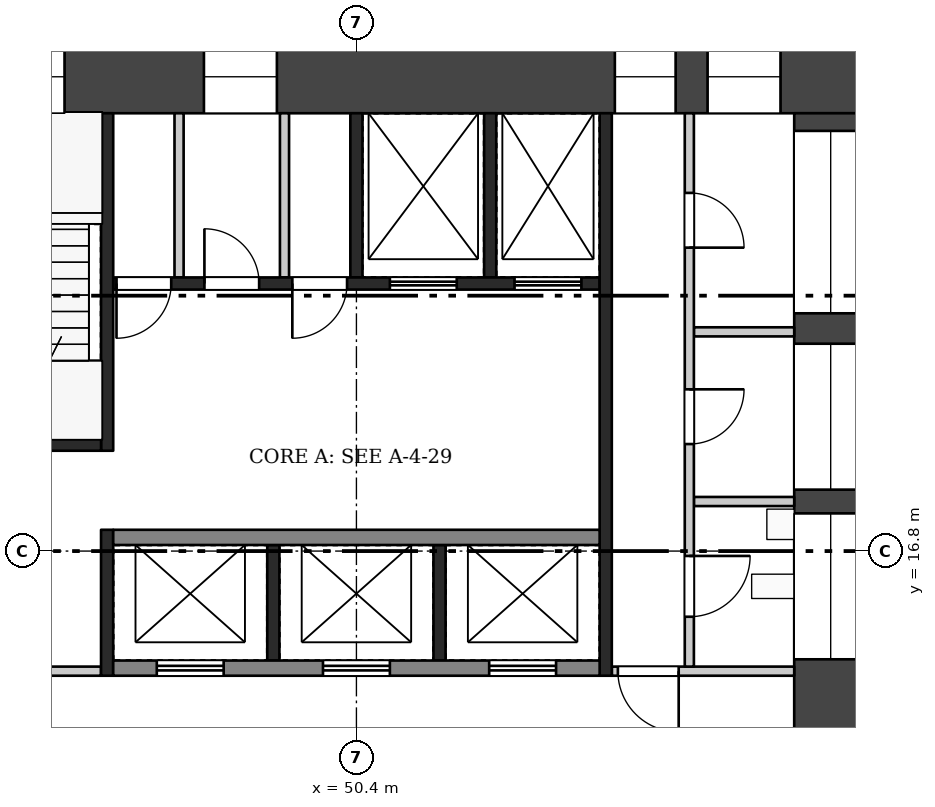
"""IFC4 building model, lengths in metres.
Left out: names, types, materials, properties, quantities, classifications, styles, units other than length and angle.
Written with IfcOpenShell. Run it as: python <this file> out.ifc"""

import sys

from ifc_helpers import new_model, si_unit, direction, frame, frame_2d, origin, place, context, subcontext, project, spatial, rectangle, extrude, element, fill, save


model = new_model("IFC4")
c1 = context("Model", 3, precision=1e-05, world=origin(), true_north=direction((0.0, 1.0)))
c2 = subcontext(c1, "Body", "Model", "MODEL_VIEW")
j1 = project(units=[si_unit("LENGTHUNIT", "METRE"), si_unit("PLANEANGLEUNIT", "RADIAN")], contexts=[c1])
p1 = place(None, origin())
s1 = spatial("IfcSite", under=j1, at=p1, CompositionType="ELEMENT")
p2 = place(p1, origin())
s2 = spatial("IfcBuilding", under=s1, at=p2, CompositionType="ELEMENT")
p3 = place(p2, frame((0.0, 0.0, 207.2)))
s3 = spatial("IfcBuildingStorey", under=s2, at=p3, CompositionType="ELEMENT", Elevation=207.2)
p4 = place(p3, frame((42.0, 24.6, 0.0), z_axis=(0.0, 0.0, 1.0), x_axis=(1.0, 0.0, 0.0)))
e1 = element("IfcWall", 1, at=p4, inside=s3, PredefinedType="SHEAR", context=c2, shape_type="SweptSolid", body=[
    extrude(rectangle(XDim=16.8, YDim=1.2, at=frame_2d((8.4, 0.0))), origin(), (0.0, 0.0, 1.0), 6.72),
])
p5 = place(p4, frame((1.8, 0.0, 0.5)))
e2 = element("IfcOpeningElement", 2, at=p5, cuts=e1, PredefinedType="OPENING", context=c2, shape_type="SweptSolid", body=[
    extrude(rectangle(XDim=1.8, YDim=2.4, at=frame_2d((0.9, 1.2))), frame((0.0, 0.61, 0.0), z_axis=(0.0, -1.0, 0.0), x_axis=(1.0, 0.0, 0.0)), (0.0, 0.0, 1.0), 1.22),
])
p6 = place(p4, frame((5.892, 0.0, 1.6)))
e3 = element("IfcOpeningElement", 3, at=p6, cuts=e1, PredefinedType="OPENING", context=c2, shape_type="SweptSolid", body=[
    extrude(rectangle(XDim=1.2, YDim=1.2, at=frame_2d((0.6, 0.6))), frame((0.0, 0.61, 0.0), z_axis=(0.0, -1.0, 0.0), x_axis=(1.0, 0.0, 0.0)), (0.0, 0.0, 1.0), 1.22),
])
p7 = place(p4, frame((12.65, 0.0, 0.6)))
e4 = element("IfcOpeningElement", 4, at=p7, cuts=e1, PredefinedType="OPENING", context=c2, shape_type="SweptSolid", body=[
    extrude(rectangle(XDim=1.0, YDim=2.1, at=frame_2d((0.5, 1.05))), frame((0.0, 0.61, 0.0), z_axis=(0.0, -1.0, 0.0), x_axis=(1.0, 0.0, 0.0)), (0.0, 0.0, 1.0), 1.22),
])
p8 = place(p4, frame((14.175, 0.0, 1.6)))
e5 = element("IfcOpeningElement", 5, at=p8, cuts=e1, PredefinedType="OPENING", context=c2, shape_type="SweptSolid", body=[
    extrude(rectangle(XDim=1.2, YDim=1.2, at=frame_2d((0.6, 0.6))), frame((0.0, 0.61, 0.0), z_axis=(0.0, -1.0, 0.0), x_axis=(1.0, 0.0, 0.0)), (0.0, 0.0, 1.0), 1.22),
])
p9 = place(p3, frame((58.2, 9.6, 0.0), z_axis=(0.0, 0.0, 1.0), x_axis=(0.0, 1.0, 0.0)))
e6 = element("IfcWall", 6, at=p9, inside=s3, PredefinedType="SHEAR", context=c2, shape_type="SweptSolid", body=[
    extrude(rectangle(XDim=14.4, YDim=1.2, at=frame_2d((7.2, 0.0))), origin(), (0.0, 0.0, 1.0), 6.72),
])
p10 = place(p9, frame((2.1, 0.0, 0.0)))
e7 = element("IfcOpeningElement", 7, at=p10, cuts=e6, PredefinedType="OPENING", context=c2, shape_type="SweptSolid", body=[
    extrude(rectangle(XDim=1.8, YDim=2.1, at=frame_2d((0.9, 1.05))), frame((0.0, 0.61, 0.0), z_axis=(0.0, -1.0, 0.0), x_axis=(1.0, 0.0, 0.0)), (0.0, 0.0, 1.0), 1.22),
])
p11 = place(p9, frame((5.42, 0.0, 1.6)))
e8 = element("IfcOpeningElement", 8, at=p11, cuts=e6, PredefinedType="OPENING", context=c2, shape_type="SweptSolid", body=[
    extrude(rectangle(XDim=2.4, YDim=1.2, at=frame_2d((1.2, 0.6))), frame((0.0, 0.61, 0.0), z_axis=(0.0, -1.0, 0.0), x_axis=(1.0, 0.0, 0.0)), (0.0, 0.0, 1.0), 1.22),
])
p12 = place(p9, frame((8.21, 0.0, 1.6)))
e9 = element("IfcOpeningElement", 9, at=p12, cuts=e6, PredefinedType="OPENING", context=c2, shape_type="SweptSolid", body=[
    extrude(rectangle(XDim=2.4, YDim=1.2, at=frame_2d((1.2, 0.6))), frame((0.0, 0.61, 0.0), z_axis=(0.0, -1.0, 0.0), x_axis=(1.0, 0.0, 0.0)), (0.0, 0.0, 1.0), 1.22),
])
p13 = place(p9, frame((11.11, 0.0, 1.6)))
e10 = element("IfcOpeningElement", 10, at=p13, cuts=e6, PredefinedType="OPENING", context=c2, shape_type="SweptSolid", body=[
    extrude(rectangle(XDim=3.0, YDim=1.2, at=frame_2d((1.5, 0.6))), frame((0.0, 0.61, 0.0), z_axis=(0.0, -1.0, 0.0), x_axis=(1.0, 0.0, 0.0)), (0.0, 0.0, 1.0), 1.22),
])
for number, where, z_axis, x_axis in (
    (11, (49.033, 15.0, 0.0), (0.0, 0.0, 1.0), (0.0, 1.0, 0.0)),
    (12, (51.767, 15.0, 0.0), (0.0, 0.0, 1.0), (0.0, 1.0, 0.0)),
):
    element("IfcWall", number, at=place(p3, frame(where, z_axis=z_axis, x_axis=x_axis)), inside=s3, PredefinedType="SHEAR", context=c2, shape_type="SweptSolid", body=[
        extrude(rectangle(XDim=1.9, YDim=0.2, at=frame_2d((0.95, 0.0))), origin(), (0.0, 0.0, 1.0), 6.72),
    ])
p14 = place(p3, frame((46.4, 14.875, 0.0), z_axis=(0.0, 0.0, 1.0), x_axis=(1.0, 0.0, 0.0)))
e13 = element("IfcWall", 13, at=p14, inside=s3, PredefinedType="SHEAR", context=c2, shape_type="SweptSolid", body=[
    extrude(rectangle(XDim=8.0, YDim=0.25, at=frame_2d((4.0, 0.0))), origin(), (0.0, 0.0, 1.0), 6.72),
])
p15 = place(p14, frame((0.717, 0.0, 0.0)))
e14 = element("IfcOpeningElement", 14, at=p15, cuts=e13, PredefinedType="OPENING", context=c2, shape_type="SweptSolid", body=[
    extrude(rectangle(XDim=1.1, YDim=2.1, at=frame_2d((0.55, 1.05))), frame((0.0, 0.135, 0.0), z_axis=(0.0, -1.0, 0.0), x_axis=(1.0, 0.0, 0.0)), (0.0, 0.0, 1.0), 0.27),
])
p16 = place(p14, frame((3.45, 0.0, 0.0)))
e15 = element("IfcOpeningElement", 15, at=p16, cuts=e13, PredefinedType="OPENING", context=c2, shape_type="SweptSolid", body=[
    extrude(rectangle(XDim=1.1, YDim=2.1, at=frame_2d((0.55, 1.05))), frame((0.0, 0.135, 0.0), z_axis=(0.0, -1.0, 0.0), x_axis=(1.0, 0.0, 0.0)), (0.0, 0.0, 1.0), 0.27),
])
p17 = place(p14, frame((6.183, 0.0, 0.0)))
e16 = element("IfcOpeningElement", 16, at=p17, cuts=e13, PredefinedType="OPENING", context=c2, shape_type="SweptSolid", body=[
    extrude(rectangle(XDim=1.1, YDim=2.1, at=frame_2d((0.55, 1.05))), frame((0.0, 0.135, 0.0), z_axis=(0.0, -1.0, 0.0), x_axis=(1.0, 0.0, 0.0)), (0.0, 0.0, 1.0), 0.27),
])
p18 = place(p3, frame((46.4, 17.025, 0.0), z_axis=(0.0, 0.0, 1.0), x_axis=(1.0, 0.0, 0.0)))
e17 = element("IfcWall", 17, at=p18, inside=s3, PredefinedType="SHEAR", context=c2, shape_type="SweptSolid", body=[
    extrude(rectangle(XDim=8.0, YDim=0.25, at=frame_2d((4.0, 0.0))), origin(), (0.0, 0.0, 1.0), 6.72),
])
for number, where, z_axis, x_axis in (
    (18, (50.4, 21.3, 0.0), (0.0, 0.0, 1.0), (0.0, 1.0, 0.0)),
    (19, (52.6, 21.3, 0.0), (0.0, 0.0, 1.0), (0.0, 1.0, 0.0)),
):
    element("IfcWall", number, at=place(p3, frame(where, z_axis=z_axis, x_axis=x_axis)), inside=s3, PredefinedType="SHEAR", context=c2, shape_type="SweptSolid", body=[
        extrude(rectangle(XDim=2.7, YDim=0.2, at=frame_2d((1.35, 0.0))), origin(), (0.0, 0.0, 1.0), 6.72),
    ])
for number, where, z_axis, x_axis in (
    (20, (47.483, 21.3, 0.0), (0.0, 0.0, 1.0), (0.0, 1.0, 0.0)),
    (21, (49.217, 21.3, 0.0), (0.0, 0.0, 1.0), (0.0, 1.0, 0.0)),
):
    element("IfcWall", number, at=place(p3, frame(where, z_axis=z_axis, x_axis=x_axis)), inside=s3, PredefinedType="PARTITIONING", context=c2, shape_type="SweptSolid", body=[
        extrude(rectangle(XDim=2.7, YDim=0.15, at=frame_2d((1.35, 0.0))), origin(), (0.0, 0.0, 1.0), 6.72),
    ])
p19 = place(p3, frame((46.4, 21.2, 0.0), z_axis=(0.0, 0.0, 1.0), x_axis=(1.0, 0.0, 0.0)))
e22 = element("IfcWall", 22, at=p19, inside=s3, PredefinedType="SHEAR", context=c2, shape_type="SweptSolid", body=[
    extrude(rectangle(XDim=8.0, YDim=0.2, at=frame_2d((4.0, 0.0))), origin(), (0.0, 0.0, 1.0), 6.72),
])
p20 = place(p19, frame((0.054, 0.0, 0.0)))
e23 = element("IfcOpeningElement", 23, at=p20, cuts=e22, PredefinedType="OPENING", context=c2, shape_type="SweptSolid", body=[
    extrude(rectangle(XDim=0.9, YDim=2.1, at=frame_2d((0.45, 1.05))), frame((0.0, 0.11, 0.0), z_axis=(0.0, -1.0, 0.0), x_axis=(1.0, 0.0, 0.0)), (0.0, 0.0, 1.0), 0.22),
])
p21 = place(p19, frame((1.5, 0.0, 0.0)))
e24 = element("IfcOpeningElement", 24, at=p21, cuts=e22, PredefinedType="OPENING", context=c2, shape_type="SweptSolid", body=[
    extrude(rectangle(XDim=0.9, YDim=2.1, at=frame_2d((0.45, 1.05))), frame((0.0, 0.11, 0.0), z_axis=(0.0, -1.0, 0.0), x_axis=(1.0, 0.0, 0.0)), (0.0, 0.0, 1.0), 0.22),
])
p22 = place(p19, frame((2.946, 0.0, 0.0)))
e25 = element("IfcOpeningElement", 25, at=p22, cuts=e22, PredefinedType="OPENING", context=c2, shape_type="SweptSolid", body=[
    extrude(rectangle(XDim=0.9, YDim=2.1, at=frame_2d((0.45, 1.05))), frame((0.0, 0.11, 0.0), z_axis=(0.0, -1.0, 0.0), x_axis=(1.0, 0.0, 0.0)), (0.0, 0.0, 1.0), 0.22),
])
p23 = place(p19, frame((4.55, 0.0, 0.0)))
e26 = element("IfcOpeningElement", 26, at=p23, cuts=e22, PredefinedType="OPENING", context=c2, shape_type="SweptSolid", body=[
    extrude(rectangle(XDim=1.1, YDim=2.1, at=frame_2d((0.55, 1.05))), frame((0.0, 0.11, 0.0), z_axis=(0.0, -1.0, 0.0), x_axis=(1.0, 0.0, 0.0)), (0.0, 0.0, 1.0), 0.22),
])
p24 = place(p19, frame((6.6, 0.0, 0.0)))
e27 = element("IfcOpeningElement", 27, at=p24, cuts=e22, PredefinedType="OPENING", context=c2, shape_type="SweptSolid", body=[
    extrude(rectangle(XDim=1.1, YDim=2.1, at=frame_2d((0.55, 1.05))), frame((0.0, 0.11, 0.0), z_axis=(0.0, -1.0, 0.0), x_axis=(1.0, 0.0, 0.0)), (0.0, 0.0, 1.0), 0.22),
])
p25 = place(p3, frame((46.3, 14.75, 0.0), z_axis=(0.0, 0.0, 1.0), x_axis=(0.0, 1.0, 0.0)))
e28 = element("IfcWall", 28, at=p25, inside=s3, PredefinedType="SHEAR", context=c2, shape_type="SweptSolid", body=[
    extrude(rectangle(XDim=2.4, YDim=0.2, at=frame_2d((1.2, 0.0))), origin(), (0.0, 0.0, 1.0), 6.72),
])
p26 = place(p3, frame((46.3, 18.45, 0.0), z_axis=(0.0, 0.0, 1.0), x_axis=(0.0, 1.0, 0.0)))
e29 = element("IfcWall", 29, at=p26, inside=s3, PredefinedType="SHEAR", context=c2, shape_type="SweptSolid", body=[
    extrude(rectangle(XDim=5.55, YDim=0.2, at=frame_2d((2.775, 0.0))), origin(), (0.0, 0.0, 1.0), 6.72),
])
p27 = place(p3, frame((43.2, 14.825, 0.0), z_axis=(0.0, 0.0, 1.0), x_axis=(1.0, 0.0, 0.0)))
e30 = element("IfcWall", 30, at=p27, inside=s3, PredefinedType="PARTITIONING", context=c2, shape_type="SweptSolid", body=[
    extrude(rectangle(XDim=3.0, YDim=0.15, at=frame_2d((1.5, 0.0))), origin(), (0.0, 0.0, 1.0), 6.72),
])
p28 = place(p27, frame((1.0, 0.0, 0.0)))
e31 = element("IfcOpeningElement", 31, at=p28, cuts=e30, PredefinedType="OPENING", context=c2, shape_type="SweptSolid", body=[
    extrude(rectangle(XDim=1.0, YDim=2.1, at=frame_2d((0.5, 1.05))), frame((0.0, 0.085, 0.0), z_axis=(0.0, -1.0, 0.0), x_axis=(1.0, 0.0, 0.0)), (0.0, 0.0, 1.0), 0.17),
])
p29 = place(p3, frame((43.2, 18.55, 0.0), z_axis=(0.0, 0.0, 1.0), x_axis=(1.0, 0.0, 0.0)))
e32 = element("IfcWall", 32, at=p29, inside=s3, PredefinedType="SHEAR", context=c2, shape_type="SweptSolid", body=[
    extrude(rectangle(XDim=3.0, YDim=0.2, at=frame_2d((1.5, 0.0))), origin(), (0.0, 0.0, 1.0), 6.72),
])
p30 = place(p29, frame((1.0, 0.0, 0.0)))
e33 = element("IfcOpeningElement", 33, at=p30, cuts=e32, PredefinedType="OPENING", context=c2, shape_type="SweptSolid", body=[
    extrude(rectangle(XDim=1.0, YDim=2.1, at=frame_2d((0.5, 1.05))), frame((0.0, 0.11, 0.0), z_axis=(0.0, -1.0, 0.0), x_axis=(1.0, 0.0, 0.0)), (0.0, 0.0, 1.0), 0.22),
])
p31 = place(p3, frame((54.5, 14.75, 0.0), z_axis=(0.0, 0.0, 1.0), x_axis=(0.0, 1.0, 0.0)))
e34 = element("IfcWall", 34, at=p31, inside=s3, PredefinedType="SHEAR", context=c2, shape_type="SweptSolid", body=[
    extrude(rectangle(XDim=9.25, YDim=0.2, at=frame_2d((4.625, 0.0))), origin(), (0.0, 0.0, 1.0), 6.72),
])
p32 = place(p3, frame((54.6, 14.825, 0.0), z_axis=(0.0, 0.0, 1.0), x_axis=(1.0, 0.0, 0.0)))
e35 = element("IfcWall", 35, at=p32, inside=s3, PredefinedType="PARTITIONING", context=c2, shape_type="SweptSolid", body=[
    extrude(rectangle(XDim=3.0, YDim=0.15, at=frame_2d((1.5, 0.0))), origin(), (0.0, 0.0, 1.0), 6.72),
])
p33 = place(p32, frame((0.1, 0.0, 0.0)))
e36 = element("IfcOpeningElement", 36, at=p33, cuts=e35, PredefinedType="OPENING", context=c2, shape_type="SweptSolid", body=[
    extrude(rectangle(XDim=1.0, YDim=2.1, at=frame_2d((0.5, 1.05))), frame((0.0, 0.085, 0.0), z_axis=(0.0, -1.0, 0.0), x_axis=(1.0, 0.0, 0.0)), (0.0, 0.0, 1.0), 0.17),
])
for number, where, z_axis, x_axis in (
    (37, (55.95, 17.615, 0.0), (0.0, 0.0, 1.0), (1.0, 0.0, 0.0)),
    (38, (55.95, 20.405, 0.0), (0.0, 0.0, 1.0), (1.0, 0.0, 0.0)),
):
    element("IfcWall", number, at=place(p3, frame(where, z_axis=z_axis, x_axis=x_axis)), inside=s3, PredefinedType="PARTITIONING", context=c2, shape_type="SweptSolid", body=[
        extrude(rectangle(XDim=1.65, YDim=0.15, at=frame_2d((0.825, 0.0))), origin(), (0.0, 0.0, 1.0), 6.72),
    ])
p34 = place(p3, frame((55.875, 14.9, 0.0), z_axis=(0.0, 0.0, 1.0), x_axis=(0.0, 1.0, 0.0)))
e39 = element("IfcWall", 39, at=p34, inside=s3, PredefinedType="PARTITIONING", context=c2, shape_type="SweptSolid", body=[
    extrude(rectangle(XDim=9.1, YDim=0.15, at=frame_2d((4.55, 0.0))), origin(), (0.0, 0.0, 1.0), 6.72),
])
p35 = place(p34, frame((0.82, 0.0, 0.0)))
e40 = element("IfcOpeningElement", 40, at=p35, cuts=e39, PredefinedType="OPENING", context=c2, shape_type="SweptSolid", body=[
    extrude(rectangle(XDim=1.0, YDim=2.1, at=frame_2d((0.5, 1.05))), frame((0.0, 0.085, 0.0), z_axis=(0.0, -1.0, 0.0), x_axis=(1.0, 0.0, 0.0)), (0.0, 0.0, 1.0), 0.17),
])
p36 = place(p34, frame((3.66, 0.0, 0.0)))
e41 = element("IfcOpeningElement", 41, at=p36, cuts=e39, PredefinedType="OPENING", context=c2, shape_type="SweptSolid", body=[
    extrude(rectangle(XDim=0.9, YDim=2.1, at=frame_2d((0.45, 1.05))), frame((0.0, 0.085, 0.0), z_axis=(0.0, -1.0, 0.0), x_axis=(1.0, 0.0, 0.0)), (0.0, 0.0, 1.0), 0.17),
])
p37 = place(p34, frame((6.89, 0.0, 0.0)))
e42 = element("IfcOpeningElement", 42, at=p37, cuts=e39, PredefinedType="OPENING", context=c2, shape_type="SweptSolid", body=[
    extrude(rectangle(XDim=0.9, YDim=2.1, at=frame_2d((0.45, 1.05))), frame((0.0, 0.085, 0.0), z_axis=(0.0, -1.0, 0.0), x_axis=(1.0, 0.0, 0.0)), (0.0, 0.0, 1.0), 0.17),
])
p38 = place(p15, origin())
e43 = element("IfcDoor", 43, at=p38, inside=s3, OperationType="DOUBLE_DOOR_SLIDING", PredefinedType="DOOR", context=c2, shape_type="SweptSolid", body=[
    extrude(rectangle(XDim=1.1, YDim=2.1, at=frame_2d((0.55, 1.05))), frame((0.0, 0.025, 0.0), z_axis=(0.0, -1.0, 0.0), x_axis=(1.0, 0.0, 0.0)), (0.0, 0.0, 1.0), 0.05),
])
fill(e14, e43)
p39 = place(p16, origin())
e44 = element("IfcDoor", 44, at=p39, inside=s3, OperationType="DOUBLE_DOOR_SLIDING", PredefinedType="DOOR", context=c2, shape_type="SweptSolid", body=[
    extrude(rectangle(XDim=1.1, YDim=2.1, at=frame_2d((0.55, 1.05))), frame((0.0, 0.025, 0.0), z_axis=(0.0, -1.0, 0.0), x_axis=(1.0, 0.0, 0.0)), (0.0, 0.0, 1.0), 0.05),
])
fill(e15, e44)
p40 = place(p17, origin())
e45 = element("IfcDoor", 45, at=p40, inside=s3, OperationType="DOUBLE_DOOR_SLIDING", PredefinedType="DOOR", context=c2, shape_type="SweptSolid", body=[
    extrude(rectangle(XDim=1.1, YDim=2.1, at=frame_2d((0.55, 1.05))), frame((0.0, 0.025, 0.0), z_axis=(0.0, -1.0, 0.0), x_axis=(1.0, 0.0, 0.0)), (0.0, 0.0, 1.0), 0.05),
])
fill(e16, e45)
p41 = place(p20, frame((0.9, 0.0, 0.0), z_axis=(0.0, 0.0, 1.0), x_axis=(-1.0, 0.0, 0.0)))
e46 = element("IfcDoor", 46, at=p41, inside=s3, OperationType="SINGLE_SWING_RIGHT", PredefinedType="DOOR", context=c2, shape_type="SweptSolid", body=[
    extrude(rectangle(XDim=0.9, YDim=2.1, at=frame_2d((0.45, 1.05))), frame((0.0, 0.025, 0.0), z_axis=(0.0, -1.0, 0.0), x_axis=(1.0, 0.0, 0.0)), (0.0, 0.0, 1.0), 0.05),
])
fill(e23, e46)
p42 = place(p21, origin())
e47 = element("IfcDoor", 47, at=p42, inside=s3, OperationType="SINGLE_SWING_LEFT", PredefinedType="DOOR", context=c2, shape_type="SweptSolid", body=[
    extrude(rectangle(XDim=0.9, YDim=2.1, at=frame_2d((0.45, 1.05))), frame((0.0, 0.025, 0.0), z_axis=(0.0, -1.0, 0.0), x_axis=(1.0, 0.0, 0.0)), (0.0, 0.0, 1.0), 0.05),
])
fill(e24, e47)
p43 = place(p22, frame((0.9, 0.0, 0.0), z_axis=(0.0, 0.0, 1.0), x_axis=(-1.0, 0.0, 0.0)))
e48 = element("IfcDoor", 48, at=p43, inside=s3, OperationType="SINGLE_SWING_RIGHT", PredefinedType="DOOR", context=c2, shape_type="SweptSolid", body=[
    extrude(rectangle(XDim=0.9, YDim=2.1, at=frame_2d((0.45, 1.05))), frame((0.0, 0.025, 0.0), z_axis=(0.0, -1.0, 0.0), x_axis=(1.0, 0.0, 0.0)), (0.0, 0.0, 1.0), 0.05),
])
fill(e25, e48)
p44 = place(p23, origin())
e49 = element("IfcDoor", 49, at=p44, inside=s3, OperationType="DOUBLE_DOOR_SLIDING", PredefinedType="DOOR", context=c2, shape_type="SweptSolid", body=[
    extrude(rectangle(XDim=1.1, YDim=2.1, at=frame_2d((0.55, 1.05))), frame((0.0, 0.025, 0.0), z_axis=(0.0, -1.0, 0.0), x_axis=(1.0, 0.0, 0.0)), (0.0, 0.0, 1.0), 0.05),
])
fill(e26, e49)
p45 = place(p24, origin())
e50 = element("IfcDoor", 50, at=p45, inside=s3, OperationType="DOUBLE_DOOR_SLIDING", PredefinedType="DOOR", context=c2, shape_type="SweptSolid", body=[
    extrude(rectangle(XDim=1.1, YDim=2.1, at=frame_2d((0.55, 1.05))), frame((0.0, 0.025, 0.0), z_axis=(0.0, -1.0, 0.0), x_axis=(1.0, 0.0, 0.0)), (0.0, 0.0, 1.0), 0.05),
])
fill(e27, e50)
p46 = place(p33, frame((1.0, 0.0, 0.0), z_axis=(0.0, 0.0, 1.0), x_axis=(-1.0, 0.0, 0.0)))
e51 = element("IfcDoor", 51, at=p46, inside=s3, OperationType="SINGLE_SWING_LEFT", PredefinedType="DOOR", context=c2, shape_type="SweptSolid", body=[
    extrude(rectangle(XDim=1.0, YDim=2.1, at=frame_2d((0.5, 1.05))), frame((0.0, 0.025, 0.0), z_axis=(0.0, -1.0, 0.0), x_axis=(1.0, 0.0, 0.0)), (0.0, 0.0, 1.0), 0.05),
])
fill(e36, e51)
p47 = place(p35, frame((1.0, 0.0, 0.0), z_axis=(0.0, 0.0, 1.0), x_axis=(-1.0, 0.0, 0.0)))
e52 = element("IfcDoor", 52, at=p47, inside=s3, OperationType="SINGLE_SWING_LEFT", PredefinedType="DOOR", context=c2, shape_type="SweptSolid", body=[
    extrude(rectangle(XDim=1.0, YDim=2.1, at=frame_2d((0.5, 1.05))), frame((0.0, 0.025, 0.0), z_axis=(0.0, -1.0, 0.0), x_axis=(1.0, 0.0, 0.0)), (0.0, 0.0, 1.0), 0.05),
])
fill(e40, e52)
p48 = place(p36, frame((0.9, 0.0, 0.0), z_axis=(0.0, 0.0, 1.0), x_axis=(-1.0, 0.0, 0.0)))
e53 = element("IfcDoor", 53, at=p48, inside=s3, OperationType="SINGLE_SWING_LEFT", PredefinedType="DOOR", context=c2, shape_type="SweptSolid", body=[
    extrude(rectangle(XDim=0.9, YDim=2.1, at=frame_2d((0.45, 1.05))), frame((0.0, 0.025, 0.0), z_axis=(0.0, -1.0, 0.0), x_axis=(1.0, 0.0, 0.0)), (0.0, 0.0, 1.0), 0.05),
])
fill(e41, e53)
p49 = place(p37, frame((0.9, 0.0, 0.0), z_axis=(0.0, 0.0, 1.0), x_axis=(-1.0, 0.0, 0.0)))
e54 = element("IfcDoor", 54, at=p49, inside=s3, OperationType="SINGLE_SWING_RIGHT", PredefinedType="DOOR", context=c2, shape_type="SweptSolid", body=[
    extrude(rectangle(XDim=0.9, YDim=2.1, at=frame_2d((0.45, 1.05))), frame((0.0, 0.025, 0.0), z_axis=(0.0, -1.0, 0.0), x_axis=(1.0, 0.0, 0.0)), (0.0, 0.0, 1.0), 0.05),
])
fill(e42, e54)
p50 = place(p5, origin())
e55 = element("IfcWindow", 55, at=p50, inside=s3, PartitioningType="SINGLE_PANEL", PredefinedType="WINDOW", context=c2, shape_type="SweptSolid", body=[
    extrude(rectangle(XDim=1.8, YDim=2.4, at=frame_2d((0.9, 1.2))), frame((0.0, 0.03, 0.0), z_axis=(0.0, -1.0, 0.0), x_axis=(1.0, 0.0, 0.0)), (0.0, 0.0, 1.0), 0.06),
])
fill(e2, e55)
p51 = place(p6, origin())
e56 = element("IfcWindow", 56, at=p51, inside=s3, PartitioningType="SINGLE_PANEL", PredefinedType="WINDOW", context=c2, shape_type="SweptSolid", body=[
    extrude(rectangle(XDim=1.2, YDim=1.2, at=frame_2d((0.6, 0.6))), frame((0.0, 0.03, 0.0), z_axis=(0.0, -1.0, 0.0), x_axis=(1.0, 0.0, 0.0)), (0.0, 0.0, 1.0), 0.06),
])
fill(e3, e56)
p52 = place(p7, origin())
e57 = element("IfcWindow", 57, at=p52, inside=s3, PartitioningType="SINGLE_PANEL", PredefinedType="WINDOW", context=c2, shape_type="SweptSolid", body=[
    extrude(rectangle(XDim=1.0, YDim=2.1, at=frame_2d((0.5, 1.05))), frame((0.0, 0.03, 0.0), z_axis=(0.0, -1.0, 0.0), x_axis=(1.0, 0.0, 0.0)), (0.0, 0.0, 1.0), 0.06),
])
fill(e4, e57)
p53 = place(p8, origin())
e58 = element("IfcWindow", 58, at=p53, inside=s3, PartitioningType="SINGLE_PANEL", PredefinedType="WINDOW", context=c2, shape_type="SweptSolid", body=[
    extrude(rectangle(XDim=1.2, YDim=1.2, at=frame_2d((0.6, 0.6))), frame((0.0, 0.03, 0.0), z_axis=(0.0, -1.0, 0.0), x_axis=(1.0, 0.0, 0.0)), (0.0, 0.0, 1.0), 0.06),
])
fill(e5, e58)
p54 = place(p11, origin())
e59 = element("IfcWindow", 59, at=p54, inside=s3, PartitioningType="SINGLE_PANEL", PredefinedType="WINDOW", context=c2, shape_type="SweptSolid", body=[
    extrude(rectangle(XDim=2.4, YDim=1.2, at=frame_2d((1.2, 0.6))), frame((0.0, 0.03, 0.0), z_axis=(0.0, -1.0, 0.0), x_axis=(1.0, 0.0, 0.0)), (0.0, 0.0, 1.0), 0.06),
])
fill(e8, e59)
p55 = place(p12, origin())
e60 = element("IfcWindow", 60, at=p55, inside=s3, PartitioningType="SINGLE_PANEL", PredefinedType="WINDOW", context=c2, shape_type="SweptSolid", body=[
    extrude(rectangle(XDim=2.4, YDim=1.2, at=frame_2d((1.2, 0.6))), frame((0.0, 0.03, 0.0), z_axis=(0.0, -1.0, 0.0), x_axis=(1.0, 0.0, 0.0)), (0.0, 0.0, 1.0), 0.06),
])
fill(e9, e60)
p56 = place(p13, origin())
e61 = element("IfcWindow", 61, at=p56, inside=s3, PartitioningType="SINGLE_PANEL", PredefinedType="WINDOW", context=c2, shape_type="SweptSolid", body=[
    extrude(rectangle(XDim=3.0, YDim=1.2, at=frame_2d((1.5, 0.6))), frame((0.0, 0.03, 0.0), z_axis=(0.0, -1.0, 0.0), x_axis=(1.0, 0.0, 0.0)), (0.0, 0.0, 1.0), 0.06),
])
fill(e10, e61)
save(model, sys.argv[1])
